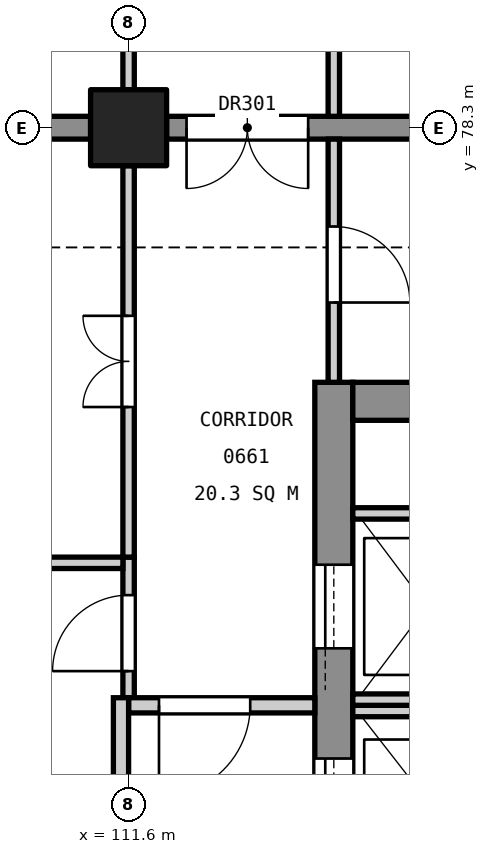
"""IFC4 building model, lengths in metres.
Left out: names, types, materials, properties, quantities, classifications, styles, units other than length and angle.
Written with IfcOpenShell. Run it as: python <this file> out.ifc"""

import sys

from ifc_helpers import new_model, si_unit, direction, frame, frame_2d, origin, origin_2d, place, context, subcontext, project, spatial, rectangle, extrude, element, fill, save


model = new_model("IFC4")
c1 = context("Model", 3, precision=1e-05, world=origin(), true_north=direction((0.0, 1.0)))
c2 = subcontext(c1, "Body", "Model", "MODEL_VIEW")
j1 = project(units=[si_unit("LENGTHUNIT", "METRE"), si_unit("PLANEANGLEUNIT", "RADIAN")], contexts=[c1])
p1 = place(None, origin())
s1 = spatial("IfcSite", under=j1, at=p1, CompositionType="ELEMENT")
p2 = place(p1, origin())
s2 = spatial("IfcBuilding", under=s1, at=p2, CompositionType="ELEMENT")
p3 = place(p2, frame((0.0, 0.0, 31.8)))
s3 = spatial("IfcBuildingStorey", under=s2, at=p3, CompositionType="ELEMENT", Elevation=31.8)
p4 = place(p3, frame((111.6, 78.3, 0.0), z_axis=(0.0, 0.0, 1.0), x_axis=(1.0, 0.0, 0.0)))
e1 = element("IfcColumn", 1, at=p4, inside=s3, PredefinedType="COLUMN", context=c2, shape_type="SweptSolid", body=[
    extrude(rectangle(XDim=1.0, YDim=1.0, at=origin_2d()), origin(), (0.0, 0.0, 1.0), 4.8),
])
p5 = place(p3, frame((114.3, 60.05, 0.0), z_axis=(0.0, 0.0, 1.0), x_axis=(0.0, 1.0, 0.0)))
e2 = element("IfcWall", 2, at=p5, inside=s3, PredefinedType="SHEAR", context=c2, shape_type="SweptSolid", body=[
    extrude(rectangle(XDim=14.9, YDim=0.5, at=frame_2d((7.45, 0.0))), origin(), (0.0, 0.0, 1.0), 4.55),
])
p6 = place(p5, frame((0.55, 0.0, 0.0)))
e3 = element("IfcOpeningElement", 3, at=p6, cuts=e2, PredefinedType="OPENING", context=c2, shape_type="SweptSolid", body=[
    extrude(rectangle(XDim=1.4, YDim=2.1, at=frame_2d((0.7, 1.05))), frame((0.0, 0.26, 0.0), z_axis=(0.0, -1.0, 0.0), x_axis=(1.0, 0.0, 0.0)), (0.0, 0.0, 1.0), 0.52),
])
p7 = place(p5, frame((8.85, 0.0, 0.0)))
e4 = element("IfcOpeningElement", 4, at=p7, cuts=e2, PredefinedType="OPENING", context=c2, shape_type="SweptSolid", body=[
    extrude(rectangle(XDim=1.1, YDim=2.1, at=frame_2d((0.55, 1.05))), frame((0.0, 0.26, 0.0), z_axis=(0.0, -1.0, 0.0), x_axis=(1.0, 0.0, 0.0)), (0.0, 0.0, 1.0), 0.52),
])
p8 = place(p5, frame((11.4, 0.0, 0.0)))
e5 = element("IfcOpeningElement", 5, at=p8, cuts=e2, PredefinedType="OPENING", context=c2, shape_type="SweptSolid", body=[
    extrude(rectangle(XDim=1.1, YDim=2.1, at=frame_2d((0.55, 1.05))), frame((0.0, 0.26, 0.0), z_axis=(0.0, -1.0, 0.0), x_axis=(1.0, 0.0, 0.0)), (0.0, 0.0, 1.0), 0.52),
])
p9 = place(p3, frame((118.55, 74.7, 0.0), z_axis=(0.0, 0.0, 1.0), x_axis=(-1.0, 0.0, 0.0)))
e6 = element("IfcWall", 6, at=p9, inside=s3, PredefinedType="SHEAR", context=c2, shape_type="SweptSolid", body=[
    extrude(rectangle(XDim=4.0, YDim=0.5, at=frame_2d((2.0, 0.0))), origin(), (0.0, 0.0, 1.0), 4.55),
])
p10 = place(p3, frame((118.3, 78.3, 0.0), z_axis=(0.0, 0.0, 1.0), x_axis=(-1.0, 0.0, 0.0)))
e7 = element("IfcWall", 7, at=p10, inside=s3, PredefinedType="SHEAR", context=c2, shape_type="SweptSolid", body=[
    extrude(rectangle(XDim=6.2, YDim=0.3, at=frame_2d((3.1, 0.0))), origin(), (0.0, 0.0, 1.0), 4.55),
])
p11 = place(p10, frame((4.337, 0.0, 0.0)))
e8 = element("IfcOpeningElement", 8, at=p11, cuts=e7, PredefinedType="OPENING", context=c2, shape_type="SweptSolid", body=[
    extrude(rectangle(XDim=1.6, YDim=2.1, at=frame_2d((0.8, 1.05))), frame((0.0, 0.16, 0.0), z_axis=(0.0, -1.0, 0.0), x_axis=(1.0, 0.0, 0.0)), (0.0, 0.0, 1.0), 0.32),
])
p12 = place(p3, frame((111.1, 78.3, 0.0), z_axis=(0.0, 0.0, 1.0), x_axis=(-1.0, 0.0, 0.0)))
e9 = element("IfcWall", 9, at=p12, inside=s3, PredefinedType="SHEAR", context=c2, shape_type="SweptSolid", body=[
    extrude(rectangle(XDim=9.8, YDim=0.3, at=frame_2d((4.9, 0.0))), origin(), (0.0, 0.0, 1.0), 4.55),
])
for number, where, z_axis, x_axis in (
    (10, (116.35, 70.625, 0.0), (0.0, 0.0, 1.0), (-1.0, 0.0, 0.0)),
    (11, (116.35, 70.775, 0.0), (0.0, 0.0, 1.0), (-1.0, 0.0, 0.0)),
    (12, (116.35, 73.225, 0.0), (0.0, 0.0, 1.0), (-1.0, 0.0, 0.0)),
):
    element("IfcWall", number, at=place(p3, frame(where, z_axis=z_axis, x_axis=x_axis)), inside=s3, PredefinedType="SOLIDWALL", context=c2, shape_type="SweptSolid", body=[
        extrude(rectangle(XDim=1.8, YDim=0.15, at=frame_2d((0.9, 0.0))), origin(), (0.0, 0.0, 1.0), 4.8),
    ])
p13 = place(p3, frame((114.3, 74.95, 0.0), z_axis=(0.0, 0.0, 1.0), x_axis=(0.0, 1.0, 0.0)))
e13 = element("IfcWall", 13, at=p13, inside=s3, PredefinedType="PARTITIONING", context=c2, shape_type="SweptSolid", body=[
    extrude(rectangle(XDim=3.2, YDim=0.15, at=frame_2d((1.6, 0.0))), origin(), (0.0, 0.0, 1.0), 3.55),
])
p14 = place(p13, frame((1.05, 0.0, 0.0)))
e14 = element("IfcOpeningElement", 14, at=p14, cuts=e13, PredefinedType="OPENING", context=c2, shape_type="SweptSolid", body=[
    extrude(rectangle(XDim=1.0, YDim=2.1, at=frame_2d((0.5, 1.05))), frame((0.0, 0.085, 0.0), z_axis=(0.0, -1.0, 0.0), x_axis=(1.0, 0.0, 0.0)), (0.0, 0.0, 1.0), 0.17),
])
p15 = place(p3, frame((114.3, 78.45, 0.0), z_axis=(0.0, 0.0, 1.0), x_axis=(0.0, 1.0, 0.0)))
e15 = element("IfcWall", 15, at=p15, inside=s3, PredefinedType="PARTITIONING", context=c2, shape_type="SweptSolid", body=[
    extrude(rectangle(XDim=10.4, YDim=0.15, at=frame_2d((5.2, 0.0))), origin(), (0.0, 0.0, 1.0), 3.55),
])
p16 = place(p15, frame((8.35, 0.0, 0.0)))
e16 = element("IfcOpeningElement", 16, at=p16, cuts=e15, PredefinedType="OPENING", context=c2, shape_type="SweptSolid", body=[
    extrude(rectangle(XDim=1.0, YDim=2.1, at=frame_2d((0.5, 1.05))), frame((0.0, 0.085, 0.0), z_axis=(0.0, -1.0, 0.0), x_axis=(1.0, 0.0, 0.0)), (0.0, 0.0, 1.0), 0.17),
])
p17 = place(p15, frame((2.95, 0.0, 0.0)))
e17 = element("IfcOpeningElement", 17, at=p17, cuts=e15, PredefinedType="OPENING", context=c2, shape_type="SweptSolid", body=[
    extrude(rectangle(XDim=1.0, YDim=2.1, at=frame_2d((0.5, 1.05))), frame((0.0, 0.085, 0.0), z_axis=(0.0, -1.0, 0.0), x_axis=(1.0, 0.0, 0.0)), (0.0, 0.0, 1.0), 0.17),
])
p18 = place(p3, frame((111.6, 70.8, 0.0), z_axis=(0.0, 0.0, 1.0), x_axis=(0.0, 1.0, 0.0)))
e18 = element("IfcWall", 18, at=p18, inside=s3, PredefinedType="PARTITIONING", context=c2, shape_type="SweptSolid", body=[
    extrude(rectangle(XDim=1.85, YDim=0.15, at=frame_2d((0.925, 0.0))), origin(), (0.0, 0.0, 1.0), 3.55),
])
p19 = place(p18, frame((0.35, 0.0, 0.0)))
e19 = element("IfcOpeningElement", 19, at=p19, cuts=e18, PredefinedType="OPENING", context=c2, shape_type="SweptSolid", body=[
    extrude(rectangle(XDim=1.0, YDim=2.1, at=frame_2d((0.5, 1.05))), frame((0.0, 0.085, 0.0), z_axis=(0.0, -1.0, 0.0), x_axis=(1.0, 0.0, 0.0)), (0.0, 0.0, 1.0), 0.17),
])
p20 = place(p3, frame((111.6, 78.8, 0.0), z_axis=(0.0, 0.0, 1.0), x_axis=(0.0, 1.0, 0.0)))
e20 = element("IfcWall", 20, at=p20, inside=s3, PredefinedType="PARTITIONING", context=c2, shape_type="SweptSolid", body=[
    extrude(rectangle(XDim=9.8, YDim=0.15, at=frame_2d((4.9, 0.0))), origin(), (0.0, 0.0, 1.0), 3.55),
])
p21 = place(p20, frame((4.3, 0.0, 0.0)))
e21 = element("IfcOpeningElement", 21, at=p21, cuts=e20, PredefinedType="OPENING", context=c2, shape_type="SweptSolid", body=[
    extrude(rectangle(XDim=1.2, YDim=2.1, at=frame_2d((0.6, 1.05))), frame((0.0, 0.085, 0.0), z_axis=(0.0, -1.0, 0.0), x_axis=(1.0, 0.0, 0.0)), (0.0, 0.0, 1.0), 0.17),
])
p22 = place(p3, frame((114.05, 70.7, 0.0), z_axis=(0.0, 0.0, 1.0), x_axis=(-1.0, 0.0, 0.0)))
e22 = element("IfcWall", 22, at=p22, inside=s3, PredefinedType="PARTITIONING", context=c2, shape_type="SweptSolid", body=[
    extrude(rectangle(XDim=2.45, YDim=0.2, at=frame_2d((1.225, 0.0))), origin(), (0.0, 0.0, 1.0), 3.55),
])
p23 = place(p22, frame((0.85, 0.0, 0.0)))
e23 = element("IfcOpeningElement", 23, at=p23, cuts=e22, PredefinedType="OPENING", context=c2, shape_type="SweptSolid", body=[
    extrude(rectangle(XDim=1.2, YDim=2.1, at=frame_2d((0.6, 1.05))), frame((0.0, 0.11, 0.0), z_axis=(0.0, -1.0, 0.0), x_axis=(1.0, 0.0, 0.0)), (0.0, 0.0, 1.0), 0.22),
])
p24 = place(p3, frame((111.5, 68.0, 0.0), z_axis=(0.0, 0.0, 1.0), x_axis=(0.0, 1.0, 0.0)))
e24 = element("IfcWall", 24, at=p24, inside=s3, PredefinedType="PARTITIONING", context=c2, shape_type="SweptSolid", body=[
    extrude(rectangle(XDim=2.8, YDim=0.2, at=frame_2d((1.4, 0.0))), origin(), (0.0, 0.0, 1.0), 3.55),
])
p25 = place(p3, frame((111.6, 72.65, 0.0), z_axis=(0.0, 0.0, 1.0), x_axis=(0.0, 1.0, 0.0)))
e25 = element("IfcWall", 25, at=p25, inside=s3, PredefinedType="PARTITIONING", context=c2, shape_type="SweptSolid", body=[
    extrude(rectangle(XDim=5.15, YDim=0.15, at=frame_2d((2.575, 0.0))), origin(), (0.0, 0.0, 1.0), 3.55),
])
p26 = place(p25, frame((1.975, 0.0, 0.0)))
e26 = element("IfcOpeningElement", 26, at=p26, cuts=e25, PredefinedType="OPENING", context=c2, shape_type="SweptSolid", body=[
    extrude(rectangle(XDim=1.2, YDim=2.1, at=frame_2d((0.6, 1.05))), frame((0.0, 0.085, 0.0), z_axis=(0.0, -1.0, 0.0), x_axis=(1.0, 0.0, 0.0)), (0.0, 0.0, 1.0), 0.17),
])
p27 = place(p3, frame((111.525, 72.575, 0.0), z_axis=(0.0, 0.0, 1.0), x_axis=(-1.0, 0.0, 0.0)))
e27 = element("IfcWall", 27, at=p27, inside=s3, PredefinedType="PARTITIONING", context=c2, shape_type="SweptSolid", body=[
    extrude(rectangle(XDim=1.925, YDim=0.15, at=frame_2d((0.962, 0.0))), origin(), (0.0, 0.0, 1.0), 3.55),
])
p28 = place(p7, origin())
e28 = element("IfcDoor", 28, at=p28, inside=s3, OperationType="SLIDING_TO_LEFT", PredefinedType="DOOR", context=c2, shape_type="SweptSolid", body=[
    extrude(rectangle(XDim=1.1, YDim=2.1, at=frame_2d((0.55, 1.05))), frame((0.0, 0.025, 0.0), z_axis=(0.0, -1.0, 0.0), x_axis=(1.0, 0.0, 0.0)), (0.0, 0.0, 1.0), 0.05),
])
fill(e4, e28)
p29 = place(p8, origin())
e29 = element("IfcDoor", 29, at=p29, inside=s3, OperationType="SLIDING_TO_LEFT", PredefinedType="DOOR", context=c2, shape_type="SweptSolid", body=[
    extrude(rectangle(XDim=1.1, YDim=2.1, at=frame_2d((0.55, 1.05))), frame((0.0, 0.025, 0.0), z_axis=(0.0, -1.0, 0.0), x_axis=(1.0, 0.0, 0.0)), (0.0, 0.0, 1.0), 0.05),
])
fill(e5, e29)
p30 = place(p14, frame((1.0, 0.0, 0.0), z_axis=(0.0, 0.0, 1.0), x_axis=(-1.0, 0.0, 0.0)))
e30 = element("IfcDoor", 30, at=p30, inside=s3, OperationType="SINGLE_SWING_RIGHT", PredefinedType="DOOR", context=c2, shape_type="SweptSolid", body=[
    extrude(rectangle(XDim=1.0, YDim=2.1, at=frame_2d((0.5, 1.05))), frame((0.0, 0.025, 0.0), z_axis=(0.0, -1.0, 0.0), x_axis=(1.0, 0.0, 0.0)), (0.0, 0.0, 1.0), 0.05),
])
fill(e14, e30)
p31 = place(p26, origin())
e31 = element("IfcDoor", 31, at=p31, inside=s3, OperationType="DOUBLE_DOOR_SINGLE_SWING", PredefinedType="DOOR", context=c2, shape_type="SweptSolid", body=[
    extrude(rectangle(XDim=1.2, YDim=2.1, at=frame_2d((0.6, 1.05))), frame((0.0, 0.025, 0.0), z_axis=(0.0, -1.0, 0.0), x_axis=(1.0, 0.0, 0.0)), (0.0, 0.0, 1.0), 0.05),
])
fill(e26, e31)
p32 = place(p19, origin())
e32 = element("IfcDoor", 32, at=p32, inside=s3, OperationType="SINGLE_SWING_LEFT", PredefinedType="DOOR", context=c2, shape_type="SweptSolid", body=[
    extrude(rectangle(XDim=1.0, YDim=2.1, at=frame_2d((0.5, 1.05))), frame((0.0, 0.025, 0.0), z_axis=(0.0, -1.0, 0.0), x_axis=(1.0, 0.0, 0.0)), (0.0, 0.0, 1.0), 0.05),
])
fill(e19, e32)
p33 = place(p23, origin())
e33 = element("IfcDoor", 33, at=p33, inside=s3, OperationType="SINGLE_SWING_RIGHT", PredefinedType="DOOR", context=c2, shape_type="SweptSolid", body=[
    extrude(rectangle(XDim=1.2, YDim=2.1, at=frame_2d((0.6, 1.05))), frame((0.0, 0.025, 0.0), z_axis=(0.0, -1.0, 0.0), x_axis=(1.0, 0.0, 0.0)), (0.0, 0.0, 1.0), 0.05),
])
fill(e23, e33)
p34 = place(p11, origin())
e34 = element("IfcDoor", 34, at=p34, inside=s3, OperationType="DOUBLE_DOOR_SINGLE_SWING", PredefinedType="DOOR", context=c2, shape_type="SweptSolid", body=[
    extrude(rectangle(XDim=1.6, YDim=2.1, at=frame_2d((0.8, 1.05))), frame((0.0, 0.025, 0.0), z_axis=(0.0, -1.0, 0.0), x_axis=(1.0, 0.0, 0.0)), (0.0, 0.0, 1.0), 0.05),
])
fill(e8, e34)
save(model, sys.argv[1])
